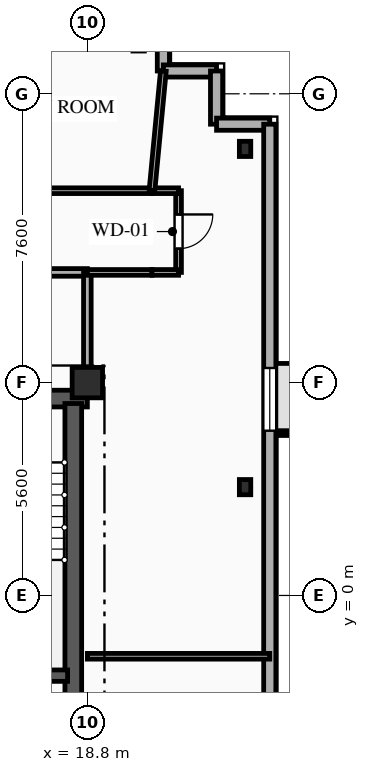
"""IFC4 building model, lengths in metres.
Left out: names, types, materials, properties, quantities, classifications, styles, units other than length and angle.
Written with IfcOpenShell. Run it as: python <this file> out.ifc"""

import sys

from ifc_helpers import new_model, si_unit, direction, frame, frame_2d, origin, origin_2d, place, context, subcontext, project, spatial, rectangle, i_section, extrude, element, fill, save


model = new_model("IFC4")
c1 = context("Model", 3, precision=1e-05, world=origin(), true_north=direction((0.0, 1.0)))
c2 = subcontext(c1, "Body", "Model", "MODEL_VIEW")
j1 = project(units=[si_unit("LENGTHUNIT", "METRE"), si_unit("PLANEANGLEUNIT", "RADIAN")], contexts=[c1])
p1 = place(None, origin())
s1 = spatial("IfcSite", under=j1, at=p1, CompositionType="ELEMENT")
p2 = place(p1, origin())
s2 = spatial("IfcBuilding", under=s1, at=p2, CompositionType="ELEMENT")
p3 = place(p2, frame((0.0, 0.0, 235.0)))
s3 = spatial("IfcBuildingStorey", under=s2, at=p3, CompositionType="ELEMENT", Elevation=235.0)
p4 = place(p3, frame((18.8, 5.6, 0.0), z_axis=(0.0, 0.0, 1.0), x_axis=(1.0, 0.0, 0.0)))
e1 = element("IfcColumn", 1, at=p4, inside=s3, PredefinedType="COLUMN", context=c2, shape_type="SweptSolid", body=[
    extrude(rectangle(XDim=0.8, YDim=0.8, at=origin_2d()), origin(), (0.0, 0.0, 1.0), 3.35),
])
for number, where, z_axis, x_axis in (
    (2, (22.95, 2.85, 0.0), (0.0, 0.0, 1.0), (1.0, 0.0, 0.0)),
    (3, (22.95, 11.75, 0.0), (0.0, 0.0, 1.0), (1.0, 0.0, 0.0)),
):
    element("IfcColumn", number, at=place(p3, frame(where, z_axis=z_axis, x_axis=x_axis)), inside=s3, PredefinedType="COLUMN", context=c2, shape_type="SweptSolid", body=[
        extrude(i_section(OverallWidth=0.3, OverallDepth=0.4, WebThickness=0.013, FlangeThickness=0.024, FilletRadius=0.027, at=origin_2d()), origin(), (0.0, 0.0, 1.0), 3.35),
    ])
for number, where, z_axis, x_axis in (
    (4, (20.8, 15.2, 0.0), (0.0, 0.0, 1.0), (0.0, -1.0, 0.0)),
    (5, (20.8, 13.8, 0.0), (0.0, 0.0, 1.0), (1.0, 0.0, 0.0)),
):
    element("IfcWall", number, at=place(p3, frame(where, z_axis=z_axis, x_axis=x_axis)), inside=s3, PredefinedType="SOLIDWALL", context=c2, shape_type="SweptSolid", body=[
        extrude(rectangle(XDim=1.4, YDim=0.32, at=frame_2d((0.7, 0.0))), origin(), (0.0, 0.0, 1.0), 3.04),
    ])
for number, where, z_axis, x_axis in (
    (6, (22.2, 13.8, 0.0), (0.0, 0.0, 1.0), (0.0, -1.0, 0.0)),
    (7, (22.2, 12.4, 0.0), (0.0, 0.0, 1.0), (1.0, 0.0, 0.0)),
):
    element("IfcWall", number, at=place(p3, frame(where, z_axis=z_axis, x_axis=x_axis)), inside=s3, PredefinedType="SOLIDWALL", context=c2, shape_type="SweptSolid", body=[
        extrude(rectangle(XDim=1.4, YDim=0.32, at=frame_2d((0.7, 0.0))), origin(), (0.0, 0.0, 1.0), 3.04),
    ])
p5 = place(p3, frame((23.6, 12.4, 0.0), z_axis=(0.0, 0.0, 1.0), x_axis=(0.0, -1.0, 0.0)))
e8 = element("IfcWall", 8, at=p5, inside=s3, PredefinedType="SOLIDWALL", context=c2, shape_type="SweptSolid", body=[
    extrude(rectangle(XDim=28.0, YDim=0.32, at=frame_2d((14.0, 0.0))), origin(), (0.0, 0.0, 1.0), 3.04),
])
p6 = place(p5, frame((6.415, 0.0, 0.85)))
e9 = element("IfcOpeningElement", 9, at=p6, cuts=e8, PredefinedType="OPENING", context=c2, shape_type="SweptSolid", body=[
    extrude(rectangle(XDim=1.65, YDim=1.85, at=frame_2d((0.825, 0.925))), frame((0.0, 0.17, 0.0), z_axis=(0.0, -1.0, 0.0), x_axis=(1.0, 0.0, 0.0)), (0.0, 0.0, 1.0), 0.34),
])
p7 = place(p5, frame((19.975, 0.0, 0.85)))
e10 = element("IfcOpeningElement", 10, at=p7, cuts=e8, PredefinedType="OPENING", context=c2, shape_type="SweptSolid", body=[
    extrude(rectangle(XDim=1.65, YDim=1.85, at=frame_2d((0.825, 0.925))), frame((0.0, 0.17, 0.0), z_axis=(0.0, -1.0, 0.0), x_axis=(1.0, 0.0, 0.0)), (0.0, 0.0, 1.0), 0.34),
])
p8 = place(p3, frame((9.2, 5.18, 0.0), z_axis=(0.0, 0.0, 1.0), x_axis=(1.0, 0.0, 0.0)))
e11 = element("IfcWall", 11, at=p8, inside=s3, PredefinedType="SHEAR", context=c2, shape_type="SweptSolid", body=[
    extrude(rectangle(XDim=9.6, YDim=0.44, at=frame_2d((4.8, 0.0))), origin(), (0.0, 0.0, 1.0), 3.04),
])
p9 = place(p8, frame((6.95, 0.0, 0.0)))
e12 = element("IfcOpeningElement", 12, at=p9, cuts=e11, PredefinedType="OPENING", context=c2, shape_type="SweptSolid", body=[
    extrude(rectangle(XDim=1.1, YDim=2.15, at=frame_2d((0.55, 1.075))), frame((0.0, 0.23, 0.0), z_axis=(0.0, -1.0, 0.0), x_axis=(1.0, 0.0, 0.0)), (0.0, 0.0, 1.0), 0.46),
])
p10 = place(p8, frame((3.775, 0.0, 0.0)))
e13 = element("IfcOpeningElement", 13, at=p10, cuts=e11, PredefinedType="OPENING", context=c2, shape_type="SweptSolid", body=[
    extrude(rectangle(XDim=1.05, YDim=2.1, at=frame_2d((0.525, 1.05))), frame((0.0, 0.23, 0.0), z_axis=(0.0, -1.0, 0.0), x_axis=(1.0, 0.0, 0.0)), (0.0, 0.0, 1.0), 0.46),
])
p11 = place(p3, frame((18.43, -5.05, 0.0), z_axis=(0.0, 0.0, 1.0), x_axis=(0.0, 1.0, 0.0)))
e14 = element("IfcWall", 14, at=p11, inside=s3, PredefinedType="SHEAR", context=c2, shape_type="SweptSolid", body=[
    extrude(rectangle(XDim=10.1, YDim=0.44, at=frame_2d((5.05, 0.0))), origin(), (0.0, 0.0, 1.0), 3.04),
])
p12 = place(p3, frame((15.1, -2.11, 0.0), z_axis=(0.0, 0.0, 1.0), x_axis=(1.0, 0.0, 0.0)))
e15 = element("IfcWall", 15, at=p12, inside=s3, PredefinedType="SHEAR", context=c2, shape_type="SweptSolid", body=[
    extrude(rectangle(XDim=3.18, YDim=0.3, at=frame_2d((1.59, 0.0))), origin(), (0.0, 0.0, 1.0), 3.04),
])
p13 = place(p3, frame((18.8, 8.5, 0.0), z_axis=(0.0, 0.0, 1.0), x_axis=(-1.0, 0.0, 0.0)))
e16 = element("IfcWall", 16, at=p13, inside=s3, PredefinedType="PARTITIONING", context=c2, shape_type="SweptSolid", body=[
    extrude(rectangle(XDim=6.8, YDim=0.2, at=frame_2d((3.4, 0.0))), origin(), (0.0, 0.0, 1.0), 3.04),
])
p14 = place(p13, frame((3.985, 0.0, 0.0)))
e17 = element("IfcOpeningElement", 17, at=p14, cuts=e16, PredefinedType="OPENING", context=c2, shape_type="SweptSolid", body=[
    extrude(rectangle(XDim=1.1, YDim=2.15, at=frame_2d((0.55, 1.075))), frame((0.0, 0.11, 0.0), z_axis=(0.0, -1.0, 0.0), x_axis=(1.0, 0.0, 0.0)), (0.0, 0.0, 1.0), 0.22),
])
p15 = place(p3, frame((18.8, 5.6, 0.0), z_axis=(0.0, 0.0, 1.0), x_axis=(0.0, 1.0, 0.0)))
e18 = element("IfcWall", 18, at=p15, inside=s3, PredefinedType="PARTITIONING", context=c2, shape_type="SweptSolid", body=[
    extrude(rectangle(XDim=2.9, YDim=0.2, at=frame_2d((1.45, 0.0))), origin(), (0.0, 0.0, 1.0), 2.665),
])
p16 = place(p3, frame((21.2, 10.65, 0.0), z_axis=(0.0, 0.0, 1.0), x_axis=(0.0, -1.0, 0.0)))
e19 = element("IfcWall", 19, at=p16, inside=s3, PredefinedType="PARTITIONING", context=c2, shape_type="SweptSolid", body=[
    extrude(rectangle(XDim=2.15, YDim=0.15, at=frame_2d((1.075, 0.0))), origin(), (0.0, 0.0, 1.0), 3.04),
])
p17 = place(p16, frame((0.625, 0.0, 0.0)))
e20 = element("IfcOpeningElement", 20, at=p17, cuts=e19, PredefinedType="OPENING", context=c2, shape_type="SweptSolid", body=[
    extrude(rectangle(XDim=0.9, YDim=2.1, at=frame_2d((0.45, 1.05))), frame((0.0, 0.085, 0.0), z_axis=(0.0, -1.0, 0.0), x_axis=(1.0, 0.0, 0.0)), (0.0, 0.0, 1.0), 0.17),
])
p18 = place(p3, frame((20.5, 8.5, 0.0), z_axis=(0.0, 0.0, 1.0), x_axis=(-1.0, 0.0, 0.0)))
e21 = element("IfcWall", 21, at=p18, inside=s3, PredefinedType="PARTITIONING", context=c2, shape_type="SweptSolid", body=[
    extrude(rectangle(XDim=1.7, YDim=0.15, at=frame_2d((0.85, 0.0))), origin(), (0.0, 0.0, 1.0), 3.04),
])
for number, where, z_axis, x_axis in (
    (22, (20.5, 10.65, 0.0), (0.0, 0.0, 1.0), (1.0, 0.0, 0.0)),
    (23, (21.2, 8.5, 0.0), (0.0, 0.0, 1.0), (-1.0, 0.0, 0.0)),
):
    element("IfcWall", number, at=place(p3, frame(where, z_axis=z_axis, x_axis=x_axis)), inside=s3, PredefinedType="PARTITIONING", context=c2, shape_type="SweptSolid", body=[
        extrude(rectangle(XDim=0.7, YDim=0.15, at=frame_2d((0.35, 0.0))), origin(), (0.0, 0.0, 1.0), 3.04),
    ])
p19 = place(p3, frame((10.25, 10.65, 0.0), z_axis=(0.0, 0.0, 1.0), x_axis=(1.0, 0.0, 0.0)))
e24 = element("IfcWall", 24, at=p19, inside=s3, PredefinedType="PARTITIONING", context=c2, shape_type="SweptSolid", body=[
    extrude(rectangle(XDim=10.25, YDim=0.15, at=frame_2d((5.125, 0.0))), origin(), (0.0, 0.0, 1.0), 3.04),
])
p20 = place(p19, frame((5.605, 0.0, 0.0)))
e25 = element("IfcOpeningElement", 25, at=p20, cuts=e24, PredefinedType="OPENING", context=c2, shape_type="SweptSolid", body=[
    extrude(rectangle(XDim=1.05, YDim=2.15, at=frame_2d((0.525, 1.075))), frame((0.0, 0.085, 0.0), z_axis=(0.0, -1.0, 0.0), x_axis=(1.0, 0.0, 0.0)), (0.0, 0.0, 1.0), 0.17),
])
p21 = place(p3, frame((18.8, -1.6, 0.0), z_axis=(0.0, 0.0, 1.0), x_axis=(1.0, 0.0, 0.0)))
e26 = element("IfcWall", 26, at=p21, inside=s3, PredefinedType="PARTITIONING", context=c2, shape_type="SweptSolid", body=[
    extrude(rectangle(XDim=4.8, YDim=0.15, at=frame_2d((2.4, 0.0))), origin(), (0.0, 0.0, 1.0), 3.04),
])
p22 = place(p3, frame((20.5, 10.65, 0.0), z_axis=(0.0, 0.0, 1.0), x_axis=(0.094820015289, 0.99549443228, 0.0)))
e27 = element("IfcWall", 27, at=p22, inside=s3, PredefinedType="PARTITIONING", context=c2, shape_type="SweptSolid", body=[
    extrude(rectangle(XDim=3.164, YDim=0.15, at=frame_2d((1.582, 0.0))), origin(), (0.0, 0.0, 1.0), 3.04),
])
p23 = place(p6, origin())
e28 = element("IfcWindow", 28, at=p23, inside=s3, PartitioningType="SINGLE_PANEL", PredefinedType="WINDOW", context=c2, shape_type="SweptSolid", body=[
    extrude(rectangle(XDim=1.65, YDim=1.85, at=frame_2d((0.825, 0.925))), frame((0.0, 0.03, 0.0), z_axis=(0.0, -1.0, 0.0), x_axis=(1.0, 0.0, 0.0)), (0.0, 0.0, 1.0), 0.06),
])
fill(e9, e28)
p24 = place(p17, origin())
e29 = element("IfcDoor", 29, at=p24, inside=s3, OperationType="SINGLE_SWING_LEFT", PredefinedType="DOOR", context=c2, shape_type="SweptSolid", body=[
    extrude(rectangle(XDim=0.9, YDim=2.1, at=frame_2d((0.45, 1.05))), frame((0.0, 0.025, 0.0), z_axis=(0.0, -1.0, 0.0), x_axis=(1.0, 0.0, 0.0)), (0.0, 0.0, 1.0), 0.05),
])
fill(e20, e29)
save(model, sys.argv[1])
